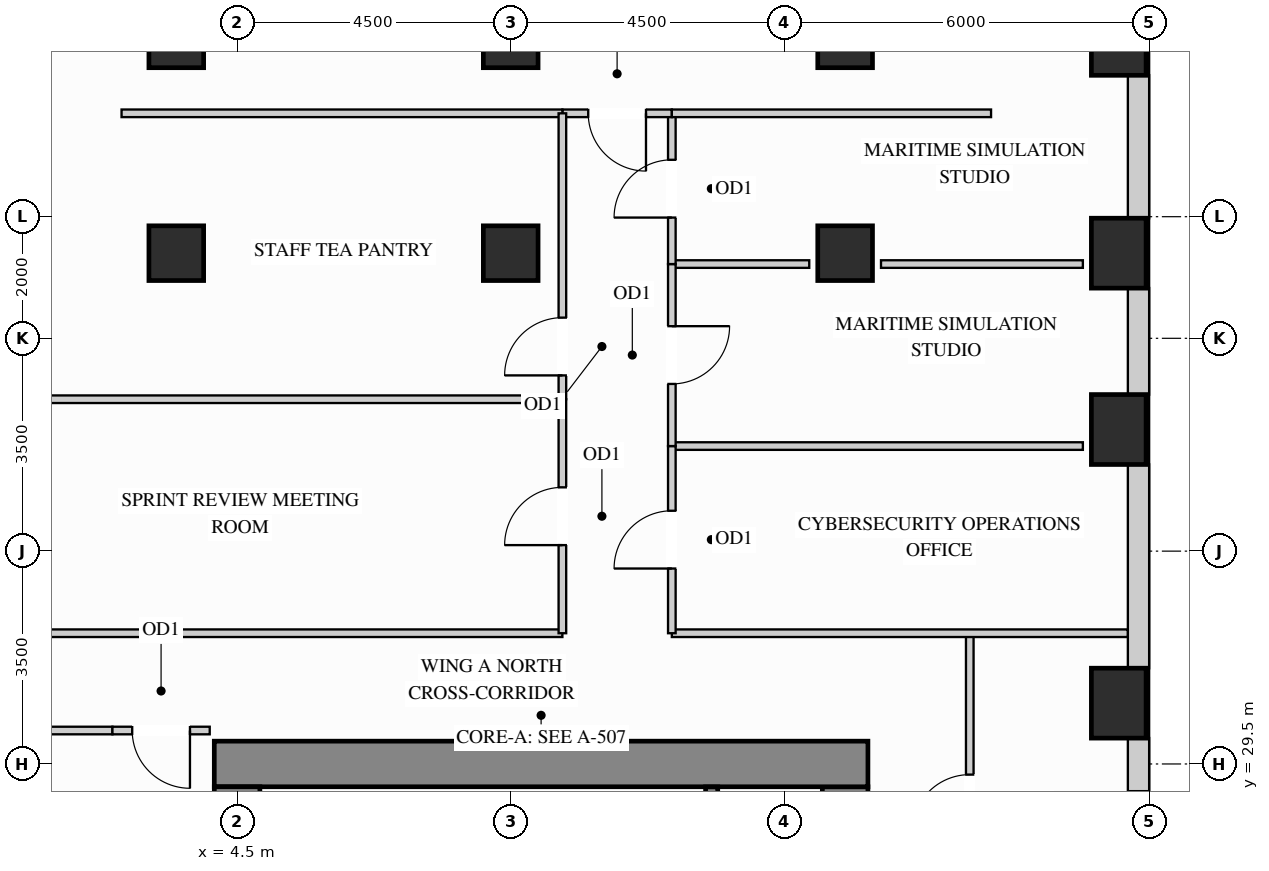
"""IFC4 building model, lengths in metres.
Left out: names, types, materials, properties, quantities, classifications, styles, units other than length and angle.
Written with IfcOpenShell. Run it as: python <this file> out.ifc"""

import sys

from ifc_helpers import new_model, si_unit, direction, frame, frame_2d, origin, origin_2d, place, context, subcontext, project, spatial, rectangle, extrude, source, transform, mapped, element, fill, save


model = new_model("IFC4")
c1 = context("Model", 3, precision=1e-05, world=origin(), true_north=direction((0.0, 1.0)))
c2 = subcontext(c1, "Body", "Model", "MODEL_VIEW")
j1 = project(units=[si_unit("LENGTHUNIT", "METRE"), si_unit("PLANEANGLEUNIT", "RADIAN")], contexts=[c1])
p1 = place(None, origin())
s1 = spatial("IfcSite", under=j1, at=p1, CompositionType="ELEMENT")
p2 = place(p1, origin())
s2 = spatial("IfcBuilding", under=s1, at=p2, CompositionType="ELEMENT")
p3 = place(p2, frame((0.0, 0.0, 77.4)))
s3 = spatial("IfcBuildingStorey", under=s2, at=p3, CompositionType="ELEMENT", Elevation=77.4)
m1 = source(origin(), c2, "Body", "SweptSolid", [
    extrude(rectangle(XDim=0.9, YDim=0.9, at=origin_2d()), origin(), (0.0, 0.0, 1.0), 3.38),
])
for number, where, z_axis, x_axis in (
    (1, (14.5, 37.9, 0.0), (0.0, 0.0, 1.0), (1.0, 0.0, 0.0)),
    (2, (14.5, 41.4, 0.0), (0.0, 0.0, 1.0), (1.0, 0.0, 0.0)),
    (3, (3.5, 37.9, 0.0), (0.0, 0.0, 1.0), (1.0, 0.0, 0.0)),
    (4, (3.5, 41.4, 0.0), (0.0, 0.0, 1.0), (1.0, 0.0, 0.0)),
    (5, (9.0, 37.9, 0.0), (0.0, 0.0, 1.0), (1.0, 0.0, 0.0)),
    (6, (9.0, 41.4, 0.0), (0.0, 0.0, 1.0), (1.0, 0.0, 0.0)),
):
    element("IfcColumn", number, at=place(p3, frame(where, z_axis=z_axis, x_axis=x_axis)), inside=s3, PredefinedType="COLUMN", context=c2, shape_type="MappedRepresentation", body=[
        mapped(m1, transform((0.0, 0.0, 0.0), x_axis=(1.0, 0.0, 0.0), y_axis=(0.0, 1.0, 0.0), z_axis=(0.0, 0.0, 1.0))),
    ])
m2 = source(origin(), c2, "Body", "SweptSolid", [
    extrude(rectangle(XDim=0.9, YDim=1.15, at=origin_2d()), origin(), (0.0, 0.0, 1.0), 3.38),
])
for number, where, z_axis, x_axis in (
    (7, (19.0, 30.5, 0.0), (0.0, 0.0, 1.0), (1.0, 0.0, 0.0)),
    (8, (19.0, 35.0, 0.0), (0.0, 0.0, 1.0), (1.0, 0.0, 0.0)),
    (9, (19.0, 37.9, 0.0), (0.0, 0.0, 1.0), (1.0, 0.0, 0.0)),
    (10, (19.0, 41.4, 0.0), (0.0, 0.0, 1.0), (1.0, 0.0, 0.0)),
):
    element("IfcColumn", number, at=place(p3, frame(where, z_axis=z_axis, x_axis=x_axis)), inside=s3, PredefinedType="COLUMN", context=c2, shape_type="MappedRepresentation", body=[
        mapped(m2, transform((0.0, 0.0, 0.0), x_axis=(1.0, 0.0, 0.0), y_axis=(0.0, 1.0, 0.0), z_axis=(0.0, 0.0, 1.0))),
    ])
m3 = source(origin(), c2, "Body", "SweptSolid", [
    extrude(rectangle(XDim=8.245, YDim=0.75, at=frame_2d((4.123, 0.0))), origin(), (0.0, 0.0, 1.0), 3.38),
])
p4 = place(p3, frame((14.5, 20.88, 0.0), z_axis=(0.0, 0.0, 1.0), x_axis=(0.0, 1.0, 0.0)))
e11 = element("IfcWall", 11, at=p4, inside=s3, PredefinedType="SHEAR", context=c2, shape_type="MappedRepresentation", body=[
    mapped(m3, transform((0.0, 0.0, 0.0), x_axis=(1.0, 0.0, 0.0), y_axis=(0.0, 1.0, 0.0), z_axis=(0.0, 0.0, 1.0))),
])
m4 = source(origin(), c2, "Body", "SweptSolid", [
    extrude(rectangle(XDim=10.75, YDim=0.75, at=frame_2d((5.375, 0.0))), origin(), (0.0, 0.0, 1.0), 3.38),
])
p5 = place(p3, frame((4.125, 29.5, 0.0), z_axis=(0.0, 0.0, 1.0), x_axis=(1.0, 0.0, 0.0)))
e12 = element("IfcWall", 12, at=p5, inside=s3, PredefinedType="SHEAR", context=c2, shape_type="MappedRepresentation", body=[
    mapped(m4, transform((0.0, 0.0, 0.0), x_axis=(1.0, 0.0, 0.0), y_axis=(0.0, 1.0, 0.0), z_axis=(0.0, 0.0, 1.0))),
])
m5 = source(origin(), c2, "Body", "SweptSolid", [
    extrude(rectangle(XDim=20.25, YDim=0.75, at=frame_2d((10.125, 0.0))), origin(), (0.0, 0.0, 1.0), 3.38),
])
p6 = place(p3, frame((4.5, 8.875, 0.0), z_axis=(0.0, 0.0, 1.0), x_axis=(0.0, 1.0, 0.0)))
e13 = element("IfcWall", 13, at=p6, inside=s3, PredefinedType="SHEAR", context=c2, shape_type="MappedRepresentation", body=[
    mapped(m5, transform((0.0, 0.0, 0.0), x_axis=(1.0, 0.0, 0.0), y_axis=(0.0, 1.0, 0.0), z_axis=(0.0, 0.0, 1.0))),
])
p7 = place(p3, frame((19.325, 27.373, 0.0), z_axis=(0.0, 0.0, 1.0), x_axis=(0.0, 1.0, 0.0)))
e14 = element("IfcWall", 14, at=p7, inside=s3, PredefinedType="SOLIDWALL", context=c2, shape_type="SweptSolid", body=[
    extrude(rectangle(XDim=2.554, YDim=0.35, at=frame_2d((1.277, 0.0))), origin(), (0.0, 0.0, 1.0), 2.519),
])
p8 = place(p7, frame((0.48, 0.0, 0.78)))
e15 = element("IfcOpeningElement", 15, at=p8, cuts=e14, PredefinedType="OPENING", context=c2, shape_type="SweptSolid", body=[
    extrude(rectangle(XDim=1.2, YDim=1.559, at=frame_2d((0.6, 0.78))), frame((0.0, 0.185, 0.0), z_axis=(0.0, -1.0, 0.0), x_axis=(1.0, 0.0, 0.0)), (0.0, 0.0, 1.0), 0.37),
])
m6 = source(origin(), c2, "Body", "SweptSolid", [
    extrude(rectangle(XDim=3.354, YDim=0.35, at=frame_2d((1.677, 0.0))), origin(), (0.0, 0.0, 1.0), 2.519),
])
p9 = place(p3, frame((19.325, 31.073, 0.0), z_axis=(0.0, 0.0, 1.0), x_axis=(0.0, 1.0, 0.0)))
e16 = element("IfcWall", 16, at=p9, inside=s3, PredefinedType="SOLIDWALL", context=c2, shape_type="MappedRepresentation", body=[
    mapped(m6, transform((0.0, 0.0, 0.0), x_axis=(1.0, 0.0, 0.0), y_axis=(0.0, 1.0, 0.0), z_axis=(0.0, 0.0, 1.0))),
])
m7 = source(origin(), c2, "Body", "SweptSolid", [
    extrude(rectangle(XDim=1.754, YDim=0.35, at=frame_2d((0.877, 0.0))), origin(), (0.0, 0.0, 1.0), 2.519),
])
p10 = place(p3, frame((19.325, 35.573, 0.0), z_axis=(0.0, 0.0, 1.0), x_axis=(0.0, 1.0, 0.0)))
e17 = element("IfcWall", 17, at=p10, inside=s3, PredefinedType="SOLIDWALL", context=c2, shape_type="MappedRepresentation", body=[
    mapped(m7, transform((0.0, 0.0, 0.0), x_axis=(1.0, 0.0, 0.0), y_axis=(0.0, 1.0, 0.0), z_axis=(0.0, 0.0, 1.0))),
])
m8 = source(origin(), c2, "Body", "SweptSolid", [
    extrude(rectangle(XDim=2.354, YDim=0.35, at=frame_2d((1.177, 0.0))), origin(), (0.0, 0.0, 1.0), 2.519),
])
p11 = place(p3, frame((19.325, 38.473, 0.0), z_axis=(0.0, 0.0, 1.0), x_axis=(0.0, 1.0, 0.0)))
e18 = element("IfcWall", 18, at=p11, inside=s3, PredefinedType="SOLIDWALL", context=c2, shape_type="MappedRepresentation", body=[
    mapped(m8, transform((0.0, 0.0, 0.0), x_axis=(1.0, 0.0, 0.0), y_axis=(0.0, 1.0, 0.0), z_axis=(0.0, 0.0, 1.0))),
])
p12 = place(p3, frame((16.55, 26.05, 0.0), z_axis=(0.0, 0.0, 1.0), x_axis=(0.0, 1.0, 0.0)))
e19 = element("IfcWall", 19, at=p12, inside=s3, PredefinedType="PARTITIONING", context=c2, shape_type="SweptSolid", body=[
    extrude(rectangle(XDim=5.6, YDim=0.125, at=frame_2d((2.8, 0.0))), origin(), (0.0, 0.0, 1.0), 3.365),
])
p13 = place(p12, frame((2.325, 0.0, 0.0)))
e20 = element("IfcOpeningElement", 20, at=p13, cuts=e19, PredefinedType="OPENING", context=c2, shape_type="SweptSolid", body=[
    extrude(rectangle(XDim=0.95, YDim=2.15, at=frame_2d((0.475, 1.075))), frame((0.0, 0.073, 0.0), z_axis=(0.0, -1.0, 0.0), x_axis=(1.0, 0.0, 0.0)), (0.0, 0.0, 1.0), 0.145),
])
m9 = source(origin(), c2, "Body", "SweptSolid", [
    extrude(rectangle(XDim=6.76, YDim=0.125, at=frame_2d((3.38, 0.0))), origin(), (0.0, 0.0, 1.0), 3.365),
])
p14 = place(p3, frame((11.65, 34.728, 0.0), z_axis=(0.0, 0.0, 1.0), x_axis=(1.0, 0.0, 0.0)))
e21 = element("IfcWall", 21, at=p14, inside=s3, PredefinedType="PARTITIONING", context=c2, shape_type="MappedRepresentation", body=[
    mapped(m9, transform((0.0, 0.0, 0.0), x_axis=(1.0, 0.0, 0.0), y_axis=(0.0, 1.0, 0.0), z_axis=(0.0, 0.0, 1.0))),
])
m10 = source(origin(), c2, "Body", "SweptSolid", [
    extrude(rectangle(XDim=2.26, YDim=0.125, at=frame_2d((1.13, 0.0))), origin(), (0.0, 0.0, 1.0), 2.677),
])
p15 = place(p3, frame((11.65, 37.721, 0.0), z_axis=(0.0, 0.0, 1.0), x_axis=(1.0, 0.0, 0.0)))
e22 = element("IfcWall", 22, at=p15, inside=s3, PredefinedType="PARTITIONING", context=c2, shape_type="MappedRepresentation", body=[
    mapped(m10, transform((0.0, 0.0, 0.0), x_axis=(1.0, 0.0, 0.0), y_axis=(0.0, 1.0, 0.0), z_axis=(0.0, 0.0, 1.0))),
])
m11 = source(origin(), c2, "Body", "SweptSolid", [
    extrude(rectangle(XDim=3.32, YDim=0.125, at=frame_2d((1.66, 0.0))), origin(), (0.0, 0.0, 1.0), 2.677),
])
p16 = place(p3, frame((15.09, 37.721, 0.0), z_axis=(0.0, 0.0, 1.0), x_axis=(1.0, 0.0, 0.0)))
e23 = element("IfcWall", 23, at=p16, inside=s3, PredefinedType="PARTITIONING", context=c2, shape_type="MappedRepresentation", body=[
    mapped(m11, transform((0.0, 0.0, 0.0), x_axis=(1.0, 0.0, 0.0), y_axis=(0.0, 1.0, 0.0), z_axis=(0.0, 0.0, 1.0))),
])
m12 = source(origin(), c2, "Body", "SweptSolid", [
    extrude(rectangle(XDim=7.498, YDim=0.125, at=frame_2d((3.749, 0.0))), origin(), (0.0, 0.0, 1.0), 2.828),
])
p17 = place(p3, frame((11.65, 31.65, 0.0), z_axis=(0.0, 0.0, 1.0), x_axis=(1.0, 0.0, 0.0)))
e24 = element("IfcWall", 24, at=p17, inside=s3, PredefinedType="PARTITIONING", context=c2, shape_type="MappedRepresentation", body=[
    mapped(m12, transform((0.0, 0.0, 0.0), x_axis=(1.0, 0.0, 0.0), y_axis=(0.0, 1.0, 0.0), z_axis=(0.0, 0.0, 1.0))),
])
m13 = source(origin(), c2, "Body", "SweptSolid", [
    extrude(rectangle(XDim=9.498, YDim=0.125, at=frame_2d((4.749, 0.0))), origin(), (0.0, 0.0, 1.0), 2.828),
])
p18 = place(p3, frame((0.352, 31.65, 0.0), z_axis=(0.0, 0.0, 1.0), x_axis=(1.0, 0.0, 0.0)))
e25 = element("IfcWall", 25, at=p18, inside=s3, PredefinedType="PARTITIONING", context=c2, shape_type="MappedRepresentation", body=[
    mapped(m13, transform((0.0, 0.0, 0.0), x_axis=(1.0, 0.0, 0.0), y_axis=(0.0, 1.0, 0.0), z_axis=(0.0, 0.0, 1.0))),
])
m14 = source(origin(), c2, "Body", "SweptSolid", [
    extrude(rectangle(XDim=8.66, YDim=0.125, at=frame_2d((4.33, 0.0))), origin(), (0.0, 0.0, 1.0), 3.365),
])
p19 = place(p3, frame((1.19, 35.498, 0.0), z_axis=(0.0, 0.0, 1.0), x_axis=(1.0, 0.0, 0.0)))
e26 = element("IfcWall", 26, at=p19, inside=s3, PredefinedType="PARTITIONING", context=c2, shape_type="MappedRepresentation", body=[
    mapped(m14, transform((0.0, 0.0, 0.0), x_axis=(1.0, 0.0, 0.0), y_axis=(0.0, 1.0, 0.0), z_axis=(0.0, 0.0, 1.0))),
])
m15 = source(origin(), c2, "Body", "SweptSolid", [
    extrude(rectangle(XDim=1.26, YDim=0.125, at=frame_2d((0.63, 0.0))), origin(), (0.0, 0.0, 1.0), 3.365),
])
p20 = place(p3, frame((1.19, 30.05, 0.0), z_axis=(0.0, 0.0, 1.0), x_axis=(1.0, 0.0, 0.0)))
e27 = element("IfcWall", 27, at=p20, inside=s3, PredefinedType="PARTITIONING", context=c2, shape_type="MappedRepresentation", body=[
    mapped(m15, transform((0.0, 0.0, 0.0), x_axis=(1.0, 0.0, 0.0), y_axis=(0.0, 1.0, 0.0), z_axis=(0.0, 0.0, 1.0))),
])
p21 = place(p3, frame((2.45, 30.05, 0.0), z_axis=(0.0, 0.0, 1.0), x_axis=(1.0, 0.0, 0.0)))
e28 = element("IfcWall", 28, at=p21, inside=s3, PredefinedType="PARTITIONING", context=c2, shape_type="SweptSolid", body=[
    extrude(rectangle(XDim=1.6, YDim=0.125, at=frame_2d((0.8, 0.0))), origin(), (0.0, 0.0, 1.0), 3.365),
])
p22 = place(p21, frame((0.325, 0.0, 0.0)))
e29 = element("IfcOpeningElement", 29, at=p22, cuts=e28, PredefinedType="OPENING", context=c2, shape_type="SweptSolid", body=[
    extrude(rectangle(XDim=0.95, YDim=2.15, at=frame_2d((0.475, 1.075))), frame((0.0, 0.073, 0.0), z_axis=(0.0, -1.0, 0.0), x_axis=(1.0, 0.0, 0.0)), (0.0, 0.0, 1.0), 0.145),
])
p23 = place(p3, frame((11.65, 31.65, 0.0), z_axis=(0.0, 0.0, 1.0), x_axis=(0.0, 1.0, 0.0)))
e30 = element("IfcWall", 30, at=p23, inside=s3, PredefinedType="PARTITIONING", context=c2, shape_type="SweptSolid", body=[
    extrude(rectangle(XDim=3.078, YDim=0.125, at=frame_2d((1.539, 0.0))), origin(), (0.0, 0.0, 1.0), 3.365),
])
p24 = place(p23, frame((1.064, 0.0, 0.0)))
e31 = element("IfcOpeningElement", 31, at=p24, cuts=e30, PredefinedType="OPENING", context=c2, shape_type="SweptSolid", body=[
    extrude(rectangle(XDim=0.95, YDim=2.15, at=frame_2d((0.475, 1.075))), frame((0.0, 0.073, 0.0), z_axis=(0.0, -1.0, 0.0), x_axis=(1.0, 0.0, 0.0)), (0.0, 0.0, 1.0), 0.145),
])
p25 = place(p3, frame((11.65, 34.728, 0.0), z_axis=(0.0, 0.0, 1.0), x_axis=(0.0, 1.0, 0.0)))
e32 = element("IfcWall", 32, at=p25, inside=s3, PredefinedType="PARTITIONING", context=c2, shape_type="SweptSolid", body=[
    extrude(rectangle(XDim=2.993, YDim=0.125, at=frame_2d((1.497, 0.0))), origin(), (0.0, 0.0, 1.0), 3.365),
])
p26 = place(p25, frame((1.021, 0.0, 0.0)))
e33 = element("IfcOpeningElement", 33, at=p26, cuts=e32, PredefinedType="OPENING", context=c2, shape_type="SweptSolid", body=[
    extrude(rectangle(XDim=0.95, YDim=2.15, at=frame_2d((0.475, 1.075))), frame((0.0, 0.073, 0.0), z_axis=(0.0, -1.0, 0.0), x_axis=(1.0, 0.0, 0.0)), (0.0, 0.0, 1.0), 0.145),
])
p27 = place(p3, frame((11.65, 37.721, 0.0), z_axis=(0.0, 0.0, 1.0), x_axis=(0.0, 1.0, 0.0)))
e34 = element("IfcWall", 34, at=p27, inside=s3, PredefinedType="PARTITIONING", context=c2, shape_type="SweptSolid", body=[
    extrude(rectangle(XDim=2.479, YDim=0.125, at=frame_2d((1.24, 0.0))), origin(), (0.0, 0.0, 1.0), 3.365),
])
p28 = place(p27, frame((0.764, 0.0, 0.0)))
e35 = element("IfcOpeningElement", 35, at=p28, cuts=e34, PredefinedType="OPENING", context=c2, shape_type="SweptSolid", body=[
    extrude(rectangle(XDim=0.95, YDim=2.15, at=frame_2d((0.475, 1.075))), frame((0.0, 0.073, 0.0), z_axis=(0.0, -1.0, 0.0), x_axis=(1.0, 0.0, 0.0)), (0.0, 0.0, 1.0), 0.145),
])
p29 = place(p3, frame((9.85, 40.2, 0.0), z_axis=(0.0, 0.0, 1.0), x_axis=(1.0, 0.0, 0.0)))
e36 = element("IfcWall", 36, at=p29, inside=s3, PredefinedType="PARTITIONING", context=c2, shape_type="SweptSolid", body=[
    extrude(rectangle(XDim=1.8, YDim=0.125, at=frame_2d((0.9, 0.0))), origin(), (0.0, 0.0, 1.0), 3.365),
])
p30 = place(p29, frame((0.425, 0.0, 0.0)))
e37 = element("IfcOpeningElement", 37, at=p30, cuts=e36, PredefinedType="OPENING", context=c2, shape_type="SweptSolid", body=[
    extrude(rectangle(XDim=0.95, YDim=2.15, at=frame_2d((0.475, 1.075))), frame((0.0, 0.073, 0.0), z_axis=(0.0, -1.0, 0.0), x_axis=(1.0, 0.0, 0.0)), (0.0, 0.0, 1.0), 0.145),
])
m16 = source(origin(), c2, "Body", "SweptSolid", [
    extrude(rectangle(XDim=5.25, YDim=0.125, at=frame_2d((2.625, 0.0))), origin(), (0.0, 0.0, 1.0), 3.365),
])
p31 = place(p3, frame((11.65, 40.2, 0.0), z_axis=(0.0, 0.0, 1.0), x_axis=(1.0, 0.0, 0.0)))
e38 = element("IfcWall", 38, at=p31, inside=s3, PredefinedType="PARTITIONING", context=c2, shape_type="MappedRepresentation", body=[
    mapped(m16, transform((0.0, 0.0, 0.0), x_axis=(1.0, 0.0, 0.0), y_axis=(0.0, 1.0, 0.0), z_axis=(0.0, 0.0, 1.0))),
])
m17 = source(origin(), c2, "Body", "SweptSolid", [
    extrude(rectangle(XDim=7.25, YDim=0.125, at=frame_2d((3.625, 0.0))), origin(), (0.0, 0.0, 1.0), 3.365),
])
p32 = place(p3, frame((2.6, 40.2, 0.0), z_axis=(0.0, 0.0, 1.0), x_axis=(1.0, 0.0, 0.0)))
e39 = element("IfcWall", 39, at=p32, inside=s3, PredefinedType="PARTITIONING", context=c2, shape_type="MappedRepresentation", body=[
    mapped(m17, transform((0.0, 0.0, 0.0), x_axis=(1.0, 0.0, 0.0), y_axis=(0.0, 1.0, 0.0), z_axis=(0.0, 0.0, 1.0))),
])
p33 = place(p3, frame((9.85, 31.65, 0.0), z_axis=(0.0, 0.0, 1.0), x_axis=(0.0, 1.0, 0.0)))
e40 = element("IfcWall", 40, at=p33, inside=s3, PredefinedType="PARTITIONING", context=c2, shape_type="SweptSolid", body=[
    extrude(rectangle(XDim=3.848, YDim=0.125, at=frame_2d((1.924, 0.0))), origin(), (0.0, 0.0, 1.0), 3.365),
])
p34 = place(p33, frame((1.449, 0.0, 0.0)))
e41 = element("IfcOpeningElement", 41, at=p34, cuts=e40, PredefinedType="OPENING", context=c2, shape_type="SweptSolid", body=[
    extrude(rectangle(XDim=0.95, YDim=2.15, at=frame_2d((0.475, 1.075))), frame((0.0, 0.073, 0.0), z_axis=(0.0, -1.0, 0.0), x_axis=(1.0, 0.0, 0.0)), (0.0, 0.0, 1.0), 0.145),
])
p35 = place(p3, frame((9.85, 35.498, 0.0), z_axis=(0.0, 0.0, 1.0), x_axis=(0.0, 1.0, 0.0)))
e42 = element("IfcWall", 42, at=p35, inside=s3, PredefinedType="PARTITIONING", context=c2, shape_type="SweptSolid", body=[
    extrude(rectangle(XDim=4.702, YDim=0.125, at=frame_2d((2.351, 0.0))), origin(), (0.0, 0.0, 1.0), 3.365),
])
p36 = place(p35, frame((0.392, 0.0, 0.0)))
e43 = element("IfcOpeningElement", 43, at=p36, cuts=e42, PredefinedType="OPENING", context=c2, shape_type="SweptSolid", body=[
    extrude(rectangle(XDim=0.95, YDim=2.15, at=frame_2d((0.475, 1.075))), frame((0.0, 0.073, 0.0), z_axis=(0.0, -1.0, 0.0), x_axis=(1.0, 0.0, 0.0)), (0.0, 0.0, 1.0), 0.145),
])
m18 = source(origin(), c2, "Body", "SweptSolid", [
    extrude(rectangle(XDim=3.678, YDim=0.2, at=frame_2d((1.839, 0.0))), origin(), (0.0, 0.0, 1.0), 3.38),
])
p37 = place(p3, frame((12.305, 25.445, 0.0), z_axis=(0.0, 0.0, 1.0), x_axis=(0.0, 1.0, 0.0)))
e44 = element("IfcWall", 44, at=p37, inside=s3, PredefinedType="SHEAR", context=c2, shape_type="MappedRepresentation", body=[
    mapped(m18, transform((0.0, 0.0, 0.0), x_axis=(1.0, 0.0, 0.0), y_axis=(0.0, 1.0, 0.0), z_axis=(0.0, 0.0, 1.0))),
])
m19 = source(origin(), c2, "Body", "SweptSolid", [
    extrude(rectangle(XDim=0.95, YDim=2.15, at=frame_2d((0.475, 1.075))), frame((0.0, 0.025, 0.0), z_axis=(0.0, -1.0, 0.0), x_axis=(1.0, 0.0, 0.0)), (0.0, 0.0, 1.0), 0.05),
])
p38 = place(p13, origin())
e45 = element("IfcDoor", 45, at=p38, inside=s3, OperationType="SINGLE_SWING_LEFT", PredefinedType="DOOR", context=c2, shape_type="MappedRepresentation", body=[
    mapped(m19, transform((0.0, 0.0, 0.0), x_axis=(1.0, 0.0, 0.0), y_axis=(0.0, 1.0, 0.0), z_axis=(0.0, 0.0, 1.0))),
])
fill(e20, e45)
p39 = place(p24, origin())
e46 = element("IfcDoor", 46, at=p39, inside=s3, OperationType="SINGLE_SWING_LEFT", PredefinedType="DOOR", context=c2, shape_type="MappedRepresentation", body=[
    mapped(m19, transform((0.0, 0.0, 0.0), x_axis=(1.0, 0.0, 0.0), y_axis=(0.0, 1.0, 0.0), z_axis=(0.0, 0.0, 1.0))),
])
fill(e31, e46)
p40 = place(p26, origin())
e47 = element("IfcDoor", 47, at=p40, inside=s3, OperationType="SINGLE_SWING_RIGHT", PredefinedType="DOOR", context=c2, shape_type="MappedRepresentation", body=[
    mapped(m19, transform((0.0, 0.0, 0.0), x_axis=(1.0, 0.0, 0.0), y_axis=(0.0, 1.0, 0.0), z_axis=(0.0, 0.0, 1.0))),
])
fill(e33, e47)
p41 = place(p28, origin())
e48 = element("IfcDoor", 48, at=p41, inside=s3, OperationType="SINGLE_SWING_LEFT", PredefinedType="DOOR", context=c2, shape_type="MappedRepresentation", body=[
    mapped(m19, transform((0.0, 0.0, 0.0), x_axis=(1.0, 0.0, 0.0), y_axis=(0.0, 1.0, 0.0), z_axis=(0.0, 0.0, 1.0))),
])
fill(e35, e48)
p42 = place(p30, origin())
e49 = element("IfcDoor", 49, at=p42, inside=s3, OperationType="SINGLE_SWING_RIGHT", PredefinedType="DOOR", context=c2, shape_type="MappedRepresentation", body=[
    mapped(m19, transform((0.0, 0.0, 0.0), x_axis=(1.0, 0.0, 0.0), y_axis=(0.0, 1.0, 0.0), z_axis=(0.0, 0.0, 1.0))),
])
fill(e37, e49)
p43 = place(p34, origin())
e50 = element("IfcDoor", 50, at=p43, inside=s3, OperationType="SINGLE_SWING_LEFT", PredefinedType="DOOR", context=c2, shape_type="MappedRepresentation", body=[
    mapped(m19, transform((0.0, 0.0, 0.0), x_axis=(1.0, 0.0, 0.0), y_axis=(0.0, 1.0, 0.0), z_axis=(0.0, 0.0, 1.0))),
])
fill(e41, e50)
p44 = place(p36, origin())
e51 = element("IfcDoor", 51, at=p44, inside=s3, OperationType="SINGLE_SWING_LEFT", PredefinedType="DOOR", context=c2, shape_type="MappedRepresentation", body=[
    mapped(m19, transform((0.0, 0.0, 0.0), x_axis=(1.0, 0.0, 0.0), y_axis=(0.0, 1.0, 0.0), z_axis=(0.0, 0.0, 1.0))),
])
fill(e43, e51)
p45 = place(p22, origin())
e52 = element("IfcDoor", 52, at=p45, inside=s3, OperationType="SINGLE_SWING_RIGHT", PredefinedType="DOOR", context=c2, shape_type="MappedRepresentation", body=[
    mapped(m19, transform((0.0, 0.0, 0.0), x_axis=(1.0, 0.0, 0.0), y_axis=(0.0, 1.0, 0.0), z_axis=(0.0, 0.0, 1.0))),
])
fill(e29, e52)
m20 = source(origin(), c2, "Body", "SweptSolid", [
    extrude(rectangle(XDim=1.2, YDim=1.559, at=frame_2d((0.6, 0.78))), frame((0.0, 0.03, 0.0), z_axis=(0.0, -1.0, 0.0), x_axis=(1.0, 0.0, 0.0)), (0.0, 0.0, 1.0), 0.06),
])
p46 = place(p8, origin())
e53 = element("IfcWindow", 53, at=p46, inside=s3, PartitioningType="SINGLE_PANEL", PredefinedType="WINDOW", context=c2, shape_type="MappedRepresentation", body=[
    mapped(m20, transform((0.0, 0.0, 0.0), x_axis=(1.0, 0.0, 0.0), y_axis=(0.0, 1.0, 0.0), z_axis=(0.0, 0.0, 1.0))),
])
fill(e15, e53)
save(model, sys.argv[1])
